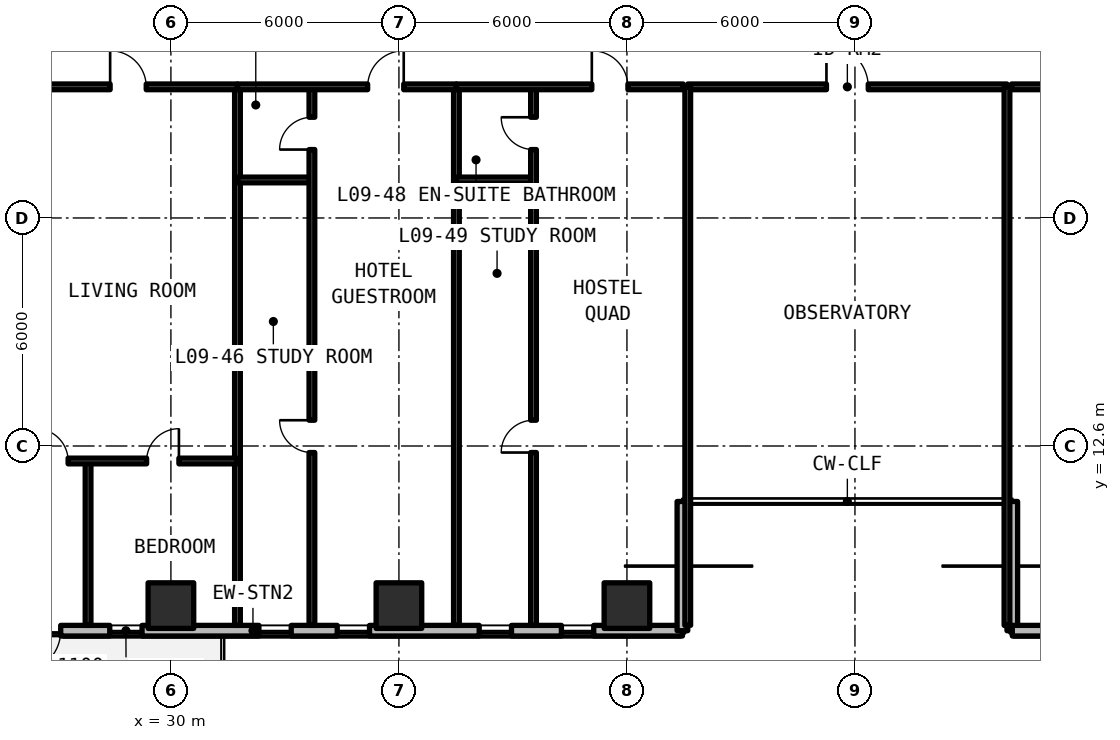
"""IFC4 building model, lengths in metres.
Left out: names, types, materials, properties, quantities, classifications, styles, units other than length and angle.
Written with IfcOpenShell. Run it as: python <this file> out.ifc"""

import sys

from ifc_helpers import new_model, si_unit, direction, frame, frame_2d, origin, origin_2d, place, context, subcontext, project, spatial, rectangle, extrude, element, fill, save


model = new_model("IFC4")
c1 = context("Model", 3, precision=1e-05, world=origin(), true_north=direction((0.0, 1.0)))
c2 = subcontext(c1, "Body", "Model", "MODEL_VIEW")
j1 = project(units=[si_unit("LENGTHUNIT", "METRE"), si_unit("PLANEANGLEUNIT", "RADIAN")], contexts=[c1])
p1 = place(None, origin())
s1 = spatial("IfcSite", under=j1, at=p1, CompositionType="ELEMENT")
p2 = place(p1, origin())
s2 = spatial("IfcBuilding", under=s1, at=p2, CompositionType="ELEMENT")
p3 = place(p2, frame((0.0, 0.0, 35.64)))
s3 = spatial("IfcBuildingStorey", under=s2, at=p3, CompositionType="ELEMENT", Elevation=35.64)
for number, where, z_axis, x_axis in (
    (1, (30.0, 8.4, 0.0), (0.0, 0.0, 1.0), (1.0, 0.0, 0.0)),
    (2, (36.0, 8.4, 0.0), (0.0, 0.0, 1.0), (1.0, 0.0, 0.0)),
    (3, (42.0, 8.4, 0.0), (0.0, 0.0, 1.0), (1.0, 0.0, 0.0)),
):
    element("IfcColumn", number, at=place(p3, frame(where, z_axis=z_axis, x_axis=x_axis)), inside=s3, PredefinedType="COLUMN", context=c2, shape_type="SweptSolid", body=[
        extrude(rectangle(XDim=1.2, YDim=1.2, at=origin_2d()), origin(), (0.0, 0.0, 1.0), 3.3),
    ])
p4 = place(p3, frame((20.858, 7.74, 0.0), z_axis=(0.0, 0.0, 1.0), x_axis=(1.0, 0.0, 0.0)))
e4 = element("IfcWall", 4, at=p4, inside=s3, PredefinedType="SOLIDWALL", context=c2, shape_type="SweptSolid", body=[
    extrude(rectangle(XDim=22.602, YDim=0.28, at=frame_2d((11.301, 0.0))), origin(), (0.0, 0.0, 1.0), 3.08),
])
p5 = place(p4, frame((5.142, 0.0, 0.0)))
e5 = element("IfcOpeningElement", 5, at=p5, cuts=e4, PredefinedType="OPENING", context=c2, shape_type="SweptSolid", body=[
    extrude(rectangle(XDim=1.1, YDim=2.15, at=frame_2d((0.55, 1.075))), frame((0.0, 0.15, 0.0), z_axis=(0.0, -1.0, 0.0), x_axis=(1.0, 0.0, 0.0)), (0.0, 0.0, 1.0), 0.3),
])
p6 = place(p4, frame((7.533, 0.0, 0.78)))
e6 = element("IfcOpeningElement", 6, at=p6, cuts=e4, PredefinedType="OPENING", context=c2, shape_type="SweptSolid", body=[
    extrude(rectangle(XDim=0.85, YDim=1.65, at=frame_2d((0.425, 0.825))), frame((0.0, 0.15, 0.0), z_axis=(0.0, -1.0, 0.0), x_axis=(1.0, 0.0, 0.0)), (0.0, 0.0, 1.0), 0.3),
])
p7 = place(p4, frame((11.458, 0.0, 0.78)))
e7 = element("IfcOpeningElement", 7, at=p7, cuts=e4, PredefinedType="OPENING", context=c2, shape_type="SweptSolid", body=[
    extrude(rectangle(XDim=0.85, YDim=1.65, at=frame_2d((0.425, 0.825))), frame((0.0, 0.15, 0.0), z_axis=(0.0, -1.0, 0.0), x_axis=(1.0, 0.0, 0.0)), (0.0, 0.0, 1.0), 0.3),
])
p8 = place(p4, frame((13.519, 0.0, 0.78)))
e8 = element("IfcOpeningElement", 8, at=p8, cuts=e4, PredefinedType="OPENING", context=c2, shape_type="SweptSolid", body=[
    extrude(rectangle(XDim=0.85, YDim=1.65, at=frame_2d((0.425, 0.825))), frame((0.0, 0.15, 0.0), z_axis=(0.0, -1.0, 0.0), x_axis=(1.0, 0.0, 0.0)), (0.0, 0.0, 1.0), 0.3),
])
p9 = place(p4, frame((17.254, 0.0, 0.78)))
e9 = element("IfcOpeningElement", 9, at=p9, cuts=e4, PredefinedType="OPENING", context=c2, shape_type="SweptSolid", body=[
    extrude(rectangle(XDim=0.85, YDim=1.65, at=frame_2d((0.425, 0.825))), frame((0.0, 0.15, 0.0), z_axis=(0.0, -1.0, 0.0), x_axis=(1.0, 0.0, 0.0)), (0.0, 0.0, 1.0), 0.3),
])
p10 = place(p4, frame((19.418, 0.0, 0.78)))
e10 = element("IfcOpeningElement", 10, at=p10, cuts=e4, PredefinedType="OPENING", context=c2, shape_type="SweptSolid", body=[
    extrude(rectangle(XDim=0.85, YDim=1.65, at=frame_2d((0.425, 0.825))), frame((0.0, 0.15, 0.0), z_axis=(0.0, -1.0, 0.0), x_axis=(1.0, 0.0, 0.0)), (0.0, 0.0, 1.0), 0.3),
])
for number, where, z_axis, x_axis in (
    (11, (43.46, 7.74, 0.0), (0.0, 0.0, 1.0), (0.0, 1.0, 0.0)),
    (12, (52.14, 11.14, 0.0), (0.0, 0.0, 1.0), (0.0, -1.0, 0.0)),
):
    element("IfcWall", number, at=place(p3, frame(where, z_axis=z_axis, x_axis=x_axis)), inside=s3, PredefinedType="SOLIDWALL", context=c2, shape_type="SweptSolid", body=[
        extrude(rectangle(XDim=3.4, YDim=0.28, at=frame_2d((1.7, 0.0))), origin(), (0.0, 0.0, 1.0), 3.08),
    ])
p11 = place(p3, frame((52.14, 7.74, 0.0), z_axis=(0.0, 0.0, 1.0), x_axis=(1.0, 0.0, 0.0)))
e13 = element("IfcWall", 13, at=p11, inside=s3, PredefinedType="SOLIDWALL", context=c2, shape_type="SweptSolid", body=[
    extrude(rectangle(XDim=44.402, YDim=0.28, at=frame_2d((22.201, 0.0))), origin(), (0.0, 0.0, 1.0), 3.08),
])
p12 = place(p11, frame((9.66, 0.0, 0.0)))
e14 = element("IfcOpeningElement", 14, at=p12, cuts=e13, PredefinedType="OPENING", context=c2, shape_type="SweptSolid", body=[
    extrude(rectangle(XDim=1.1, YDim=2.15, at=frame_2d((0.55, 1.075))), frame((0.0, 0.15, 0.0), z_axis=(0.0, -1.0, 0.0), x_axis=(1.0, 0.0, 0.0)), (0.0, 0.0, 1.0), 0.3),
])
p13 = place(p11, frame((21.76, 0.0, 0.0)))
e15 = element("IfcOpeningElement", 15, at=p13, cuts=e13, PredefinedType="OPENING", context=c2, shape_type="SweptSolid", body=[
    extrude(rectangle(XDim=1.1, YDim=2.15, at=frame_2d((0.55, 1.075))), frame((0.0, 0.15, 0.0), z_axis=(0.0, -1.0, 0.0), x_axis=(1.0, 0.0, 0.0)), (0.0, 0.0, 1.0), 0.3),
])
p14 = place(p11, frame((33.61, 0.0, 0.0)))
e16 = element("IfcOpeningElement", 16, at=p14, cuts=e13, PredefinedType="OPENING", context=c2, shape_type="SweptSolid", body=[
    extrude(rectangle(XDim=1.1, YDim=2.15, at=frame_2d((0.55, 1.075))), frame((0.0, 0.15, 0.0), z_axis=(0.0, -1.0, 0.0), x_axis=(1.0, 0.0, 0.0)), (0.0, 0.0, 1.0), 0.3),
])
p15 = place(p11, frame((2.751, 0.0, 0.78)))
e17 = element("IfcOpeningElement", 17, at=p15, cuts=e13, PredefinedType="OPENING", context=c2, shape_type="SweptSolid", body=[
    extrude(rectangle(XDim=2.2, YDim=1.66, at=frame_2d((1.1, 0.83))), frame((0.0, 0.15, 0.0), z_axis=(0.0, -1.0, 0.0), x_axis=(1.0, 0.0, 0.0)), (0.0, 0.0, 1.0), 0.3),
])
p16 = place(p11, frame((14.772, 0.0, 0.78)))
e18 = element("IfcOpeningElement", 18, at=p16, cuts=e13, PredefinedType="OPENING", context=c2, shape_type="SweptSolid", body=[
    extrude(rectangle(XDim=1.4, YDim=1.65, at=frame_2d((0.7, 0.825))), frame((0.0, 0.15, 0.0), z_axis=(0.0, -1.0, 0.0), x_axis=(1.0, 0.0, 0.0)), (0.0, 0.0, 1.0), 0.3),
])
p17 = place(p11, frame((27.925, 0.0, 0.78)))
e19 = element("IfcOpeningElement", 19, at=p17, cuts=e13, PredefinedType="OPENING", context=c2, shape_type="SweptSolid", body=[
    extrude(rectangle(XDim=2.2, YDim=1.66, at=frame_2d((1.1, 0.83))), frame((0.0, 0.15, 0.0), z_axis=(0.0, -1.0, 0.0), x_axis=(1.0, 0.0, 0.0)), (0.0, 0.0, 1.0), 0.3),
])
p18 = place(p11, frame((38.47, 0.0, 0.78)))
e20 = element("IfcOpeningElement", 20, at=p18, cuts=e13, PredefinedType="OPENING", context=c2, shape_type="SweptSolid", body=[
    extrude(rectangle(XDim=0.85, YDim=1.65, at=frame_2d((0.425, 0.825))), frame((0.0, 0.15, 0.0), z_axis=(0.0, -1.0, 0.0), x_axis=(1.0, 0.0, 0.0)), (0.0, 0.0, 1.0), 0.3),
])
p19 = place(p11, frame((40.91, 0.0, 0.78)))
e21 = element("IfcOpeningElement", 21, at=p19, cuts=e13, PredefinedType="OPENING", context=c2, shape_type="SweptSolid", body=[
    extrude(rectangle(XDim=2.2, YDim=1.66, at=frame_2d((1.1, 0.83))), frame((0.0, 0.15, 0.0), z_axis=(0.0, -1.0, 0.0), x_axis=(1.0, 0.0, 0.0)), (0.0, 0.0, 1.0), 0.3),
])
p20 = place(p3, frame((43.6, 22.05, 0.0), z_axis=(0.0, 0.0, 1.0), x_axis=(1.0, 0.0, 0.0)))
e22 = element("IfcWall", 22, at=p20, inside=s3, PredefinedType="SOLIDWALL", context=c2, shape_type="SweptSolid", body=[
    extrude(rectangle(XDim=8.4, YDim=0.15, at=frame_2d((4.2, 0.0))), origin(), (0.0, 0.0, 1.0), 2.35),
])
p21 = place(p20, frame((3.65, 0.0, 0.0)))
e23 = element("IfcOpeningElement", 23, at=p21, cuts=e22, PredefinedType="OPENING", context=c2, shape_type="SweptSolid", body=[
    extrude(rectangle(XDim=1.1, YDim=2.15, at=frame_2d((0.55, 1.075))), frame((0.0, 0.085, 0.0), z_axis=(0.0, -1.0, 0.0), x_axis=(1.0, 0.0, 0.0)), (0.0, 0.0, 1.0), 0.17),
])
for number, where, z_axis, x_axis in (
    (24, (43.6, 7.88, 0.0), (0.0, 0.0, 1.0), (0.0, 1.0, 0.0)),
    (25, (52.0, 7.88, 0.0), (0.0, 0.0, 1.0), (0.0, 1.0, 0.0)),
    (26, (31.751, 7.88, 0.0), (0.0, 0.0, 1.0), (0.0, 1.0, 0.0)),
):
    element("IfcWall", number, at=place(p3, frame(where, z_axis=z_axis, x_axis=x_axis)), inside=s3, PredefinedType="SOLIDWALL", context=c2, shape_type="SweptSolid", body=[
        extrude(rectangle(XDim=14.17, YDim=0.15, at=frame_2d((7.085, 0.0))), origin(), (0.0, 0.0, 1.0), 2.35),
    ])
p22 = place(p3, frame((27.82, 7.88, 0.0), z_axis=(0.0, 0.0, 1.0), x_axis=(0.0, 1.0, 0.0)))
e27 = element("IfcWall", 27, at=p22, inside=s3, PredefinedType="PARTITIONING", context=c2, shape_type="SweptSolid", body=[
    extrude(rectangle(XDim=4.326, YDim=0.15, at=frame_2d((2.163, 0.0))), origin(), (0.0, 0.0, 1.0), 2.35),
])
p23 = place(p3, frame((21.0, 12.206, 0.0), z_axis=(0.0, 0.0, 1.0), x_axis=(1.0, 0.0, 0.0)))
e28 = element("IfcWall", 28, at=p23, inside=s3, PredefinedType="PARTITIONING", context=c2, shape_type="SweptSolid", body=[
    extrude(rectangle(XDim=10.751, YDim=0.15, at=frame_2d((5.375, 0.0))), origin(), (0.0, 0.0, 1.0), 2.35),
])
p24 = place(p23, frame((5.445, 0.0, 0.0)))
e29 = element("IfcOpeningElement", 29, at=p24, cuts=e28, PredefinedType="OPENING", context=c2, shape_type="SweptSolid", body=[
    extrude(rectangle(XDim=0.85, YDim=2.1, at=frame_2d((0.425, 1.05))), frame((0.0, 0.085, 0.0), z_axis=(0.0, -1.0, 0.0), x_axis=(1.0, 0.0, 0.0)), (0.0, 0.0, 1.0), 0.17),
])
p25 = place(p23, frame((8.361, 0.0, 0.0)))
e30 = element("IfcOpeningElement", 30, at=p25, cuts=e28, PredefinedType="OPENING", context=c2, shape_type="SweptSolid", body=[
    extrude(rectangle(XDim=0.85, YDim=2.1, at=frame_2d((0.425, 1.05))), frame((0.0, 0.085, 0.0), z_axis=(0.0, -1.0, 0.0), x_axis=(1.0, 0.0, 0.0)), (0.0, 0.0, 1.0), 0.17),
])
p26 = place(p3, frame((21.0, 22.05, 0.0), z_axis=(0.0, 0.0, 1.0), x_axis=(1.0, 0.0, 0.0)))
e31 = element("IfcWall", 31, at=p26, inside=s3, PredefinedType="SOLIDWALL", context=c2, shape_type="SweptSolid", body=[
    extrude(rectangle(XDim=10.751, YDim=0.15, at=frame_2d((5.375, 0.0))), origin(), (0.0, 0.0, 1.0), 2.35),
])
p27 = place(p26, frame((7.401, 0.0, 0.0)))
e32 = element("IfcOpeningElement", 32, at=p27, cuts=e31, PredefinedType="OPENING", context=c2, shape_type="SweptSolid", body=[
    extrude(rectangle(XDim=0.95, YDim=2.15, at=frame_2d((0.475, 1.075))), frame((0.0, 0.085, 0.0), z_axis=(0.0, -1.0, 0.0), x_axis=(1.0, 0.0, 0.0)), (0.0, 0.0, 1.0), 0.17),
])
p28 = place(p3, frame((37.513, 7.88, 0.0), z_axis=(0.0, 0.0, 1.0), x_axis=(0.0, 1.0, 0.0)))
e33 = element("IfcWall", 33, at=p28, inside=s3, PredefinedType="SOLIDWALL", context=c2, shape_type="SweptSolid", body=[
    extrude(rectangle(XDim=14.17, YDim=0.15, at=frame_2d((7.085, 0.0))), origin(), (0.0, 0.0, 1.0), 2.35),
])
p29 = place(p3, frame((31.751, 19.6, 0.0), z_axis=(0.0, 0.0, 1.0), x_axis=(1.0, 0.0, 0.0)))
e34 = element("IfcWall", 34, at=p29, inside=s3, PredefinedType="PARTITIONING", context=c2, shape_type="SweptSolid", body=[
    extrude(rectangle(XDim=1.959, YDim=0.15, at=frame_2d((0.979, 0.0))), origin(), (0.0, 0.0, 1.0), 2.35),
])
p30 = place(p3, frame((33.71, 7.88, 0.0), z_axis=(0.0, 0.0, 1.0), x_axis=(0.0, 1.0, 0.0)))
e35 = element("IfcWall", 35, at=p30, inside=s3, PredefinedType="PARTITIONING", context=c2, shape_type="SweptSolid", body=[
    extrude(rectangle(XDim=14.17, YDim=0.15, at=frame_2d((7.085, 0.0))), origin(), (0.0, 0.0, 1.0), 2.35),
])
p31 = place(p30, frame((4.548, 0.0, 0.0)))
e36 = element("IfcOpeningElement", 36, at=p31, cuts=e35, PredefinedType="OPENING", context=c2, shape_type="SweptSolid", body=[
    extrude(rectangle(XDim=0.85, YDim=2.1, at=frame_2d((0.425, 1.05))), frame((0.0, 0.085, 0.0), z_axis=(0.0, -1.0, 0.0), x_axis=(1.0, 0.0, 0.0)), (0.0, 0.0, 1.0), 0.17),
])
p32 = place(p30, frame((12.52, 0.0, 0.0)))
e37 = element("IfcOpeningElement", 37, at=p32, cuts=e35, PredefinedType="OPENING", context=c2, shape_type="SweptSolid", body=[
    extrude(rectangle(XDim=0.85, YDim=2.1, at=frame_2d((0.425, 1.05))), frame((0.0, 0.085, 0.0), z_axis=(0.0, -1.0, 0.0), x_axis=(1.0, 0.0, 0.0)), (0.0, 0.0, 1.0), 0.17),
])
p33 = place(p3, frame((31.751, 22.05, 0.0), z_axis=(0.0, 0.0, 1.0), x_axis=(1.0, 0.0, 0.0)))
e38 = element("IfcWall", 38, at=p33, inside=s3, PredefinedType="SOLIDWALL", context=c2, shape_type="SweptSolid", body=[
    extrude(rectangle(XDim=5.761, YDim=0.15, at=frame_2d((2.881, 0.0))), origin(), (0.0, 0.0, 1.0), 2.35),
])
p34 = place(p33, frame((3.425, 0.0, 0.0)))
e39 = element("IfcOpeningElement", 39, at=p34, cuts=e38, PredefinedType="OPENING", context=c2, shape_type="SweptSolid", body=[
    extrude(rectangle(XDim=0.95, YDim=2.15, at=frame_2d((0.475, 1.075))), frame((0.0, 0.085, 0.0), z_axis=(0.0, -1.0, 0.0), x_axis=(1.0, 0.0, 0.0)), (0.0, 0.0, 1.0), 0.17),
])
p35 = place(p3, frame((37.513, 19.6, 0.0), z_axis=(0.0, 0.0, 1.0), x_axis=(1.0, 0.0, 0.0)))
e40 = element("IfcWall", 40, at=p35, inside=s3, PredefinedType="PARTITIONING", context=c2, shape_type="SweptSolid", body=[
    extrude(rectangle(XDim=2.029, YDim=0.15, at=frame_2d((1.014, 0.0))), origin(), (0.0, 0.0, 1.0), 2.35),
])
p36 = place(p3, frame((39.542, 7.88, 0.0), z_axis=(0.0, 0.0, 1.0), x_axis=(0.0, 1.0, 0.0)))
e41 = element("IfcWall", 41, at=p36, inside=s3, PredefinedType="PARTITIONING", context=c2, shape_type="SweptSolid", body=[
    extrude(rectangle(XDim=14.17, YDim=0.15, at=frame_2d((7.085, 0.0))), origin(), (0.0, 0.0, 1.0), 2.35),
])
p37 = place(p36, frame((4.548, 0.0, 0.0)))
e42 = element("IfcOpeningElement", 42, at=p37, cuts=e41, PredefinedType="OPENING", context=c2, shape_type="SweptSolid", body=[
    extrude(rectangle(XDim=0.85, YDim=2.1, at=frame_2d((0.425, 1.05))), frame((0.0, 0.085, 0.0), z_axis=(0.0, -1.0, 0.0), x_axis=(1.0, 0.0, 0.0)), (0.0, 0.0, 1.0), 0.17),
])
p38 = place(p36, frame((12.52, 0.0, 0.0)))
e43 = element("IfcOpeningElement", 43, at=p38, cuts=e41, PredefinedType="OPENING", context=c2, shape_type="SweptSolid", body=[
    extrude(rectangle(XDim=0.85, YDim=2.1, at=frame_2d((0.425, 1.05))), frame((0.0, 0.085, 0.0), z_axis=(0.0, -1.0, 0.0), x_axis=(1.0, 0.0, 0.0)), (0.0, 0.0, 1.0), 0.17),
])
p39 = place(p3, frame((37.513, 22.05, 0.0), z_axis=(0.0, 0.0, 1.0), x_axis=(1.0, 0.0, 0.0)))
e44 = element("IfcWall", 44, at=p39, inside=s3, PredefinedType="SOLIDWALL", context=c2, shape_type="SweptSolid", body=[
    extrude(rectangle(XDim=5.967, YDim=0.15, at=frame_2d((2.984, 0.0))), origin(), (0.0, 0.0, 1.0), 2.35),
])
p40 = place(p39, frame((3.563, 0.0, 0.0)))
e45 = element("IfcOpeningElement", 45, at=p40, cuts=e44, PredefinedType="OPENING", context=c2, shape_type="SweptSolid", body=[
    extrude(rectangle(XDim=0.95, YDim=2.15, at=frame_2d((0.475, 1.075))), frame((0.0, 0.085, 0.0), z_axis=(0.0, -1.0, 0.0), x_axis=(1.0, 0.0, 0.0)), (0.0, 0.0, 1.0), 0.17),
])
p41 = place(p3, frame((52.12, 22.05, 0.0), z_axis=(0.0, 0.0, 1.0), x_axis=(1.0, 0.0, 0.0)))
e46 = element("IfcWall", 46, at=p41, inside=s3, PredefinedType="SOLIDWALL", context=c2, shape_type="SweptSolid", body=[
    extrude(rectangle(XDim=6.143, YDim=0.15, at=frame_2d((3.071, 0.0))), origin(), (0.0, 0.0, 1.0), 2.35),
])
p42 = place(p41, frame((2.596, 0.0, 0.0)))
e47 = element("IfcOpeningElement", 47, at=p42, cuts=e46, PredefinedType="OPENING", context=c2, shape_type="SweptSolid", body=[
    extrude(rectangle(XDim=0.95, YDim=2.15, at=frame_2d((0.475, 1.075))), frame((0.0, 0.085, 0.0), z_axis=(0.0, -1.0, 0.0), x_axis=(1.0, 0.0, 0.0)), (0.0, 0.0, 1.0), 0.17),
])
p43 = place(p5, frame((1.1, 0.0, 0.0), z_axis=(0.0, 0.0, 1.0), x_axis=(-1.0, 0.0, 0.0)))
e48 = element("IfcDoor", 48, at=p43, inside=s3, OperationType="SINGLE_SWING_RIGHT", PredefinedType="DOOR", context=c2, shape_type="SweptSolid", body=[
    extrude(rectangle(XDim=1.1, YDim=2.15, at=frame_2d((0.55, 1.075))), frame((0.0, 0.025, 0.0), z_axis=(0.0, -1.0, 0.0), x_axis=(1.0, 0.0, 0.0)), (0.0, 0.0, 1.0), 0.05),
])
fill(e5, e48)
p44 = place(p6, origin())
e49 = element("IfcWindow", 49, at=p44, inside=s3, PartitioningType="SINGLE_PANEL", PredefinedType="WINDOW", context=c2, shape_type="SweptSolid", body=[
    extrude(rectangle(XDim=0.85, YDim=1.65, at=frame_2d((0.425, 0.825))), frame((0.0, 0.03, 0.0), z_axis=(0.0, -1.0, 0.0), x_axis=(1.0, 0.0, 0.0)), (0.0, 0.0, 1.0), 0.06),
])
fill(e6, e49)
p45 = place(p7, origin())
e50 = element("IfcWindow", 50, at=p45, inside=s3, PartitioningType="SINGLE_PANEL", PredefinedType="WINDOW", context=c2, shape_type="SweptSolid", body=[
    extrude(rectangle(XDim=0.85, YDim=1.65, at=frame_2d((0.425, 0.825))), frame((0.0, 0.03, 0.0), z_axis=(0.0, -1.0, 0.0), x_axis=(1.0, 0.0, 0.0)), (0.0, 0.0, 1.0), 0.06),
])
fill(e7, e50)
p46 = place(p8, origin())
e51 = element("IfcWindow", 51, at=p46, inside=s3, PartitioningType="SINGLE_PANEL", PredefinedType="WINDOW", context=c2, shape_type="SweptSolid", body=[
    extrude(rectangle(XDim=0.85, YDim=1.65, at=frame_2d((0.425, 0.825))), frame((0.0, 0.03, 0.0), z_axis=(0.0, -1.0, 0.0), x_axis=(1.0, 0.0, 0.0)), (0.0, 0.0, 1.0), 0.06),
])
fill(e8, e51)
p47 = place(p9, origin())
e52 = element("IfcWindow", 52, at=p47, inside=s3, PartitioningType="SINGLE_PANEL", PredefinedType="WINDOW", context=c2, shape_type="SweptSolid", body=[
    extrude(rectangle(XDim=0.85, YDim=1.65, at=frame_2d((0.425, 0.825))), frame((0.0, 0.03, 0.0), z_axis=(0.0, -1.0, 0.0), x_axis=(1.0, 0.0, 0.0)), (0.0, 0.0, 1.0), 0.06),
])
fill(e9, e52)
p48 = place(p10, origin())
e53 = element("IfcWindow", 53, at=p48, inside=s3, PartitioningType="SINGLE_PANEL", PredefinedType="WINDOW", context=c2, shape_type="SweptSolid", body=[
    extrude(rectangle(XDim=0.85, YDim=1.65, at=frame_2d((0.425, 0.825))), frame((0.0, 0.03, 0.0), z_axis=(0.0, -1.0, 0.0), x_axis=(1.0, 0.0, 0.0)), (0.0, 0.0, 1.0), 0.06),
])
fill(e10, e53)
p49 = place(p21, origin())
e54 = element("IfcDoor", 54, at=p49, inside=s3, OperationType="SINGLE_SWING_LEFT", PredefinedType="DOOR", context=c2, shape_type="SweptSolid", body=[
    extrude(rectangle(XDim=1.1, YDim=2.15, at=frame_2d((0.55, 1.075))), frame((0.0, 0.025, 0.0), z_axis=(0.0, -1.0, 0.0), x_axis=(1.0, 0.0, 0.0)), (0.0, 0.0, 1.0), 0.05),
])
fill(e23, e54)
p50 = place(p24, origin())
e55 = element("IfcDoor", 55, at=p50, inside=s3, OperationType="SINGLE_SWING_LEFT", PredefinedType="DOOR", context=c2, shape_type="SweptSolid", body=[
    extrude(rectangle(XDim=0.85, YDim=2.1, at=frame_2d((0.425, 1.05))), frame((0.0, 0.025, 0.0), z_axis=(0.0, -1.0, 0.0), x_axis=(1.0, 0.0, 0.0)), (0.0, 0.0, 1.0), 0.05),
])
fill(e29, e55)
p51 = place(p25, origin())
e56 = element("IfcDoor", 56, at=p51, inside=s3, OperationType="SINGLE_SWING_RIGHT", PredefinedType="DOOR", context=c2, shape_type="SweptSolid", body=[
    extrude(rectangle(XDim=0.85, YDim=2.1, at=frame_2d((0.425, 1.05))), frame((0.0, 0.025, 0.0), z_axis=(0.0, -1.0, 0.0), x_axis=(1.0, 0.0, 0.0)), (0.0, 0.0, 1.0), 0.05),
])
fill(e30, e56)
p52 = place(p27, origin())
e57 = element("IfcDoor", 57, at=p52, inside=s3, OperationType="SINGLE_SWING_LEFT", PredefinedType="DOOR", context=c2, shape_type="SweptSolid", body=[
    extrude(rectangle(XDim=0.95, YDim=2.15, at=frame_2d((0.475, 1.075))), frame((0.0, 0.025, 0.0), z_axis=(0.0, -1.0, 0.0), x_axis=(1.0, 0.0, 0.0)), (0.0, 0.0, 1.0), 0.05),
])
fill(e32, e57)
p53 = place(p31, origin())
e58 = element("IfcDoor", 58, at=p53, inside=s3, OperationType="SINGLE_SWING_RIGHT", PredefinedType="DOOR", context=c2, shape_type="SweptSolid", body=[
    extrude(rectangle(XDim=0.85, YDim=2.1, at=frame_2d((0.425, 1.05))), frame((0.0, 0.025, 0.0), z_axis=(0.0, -1.0, 0.0), x_axis=(1.0, 0.0, 0.0)), (0.0, 0.0, 1.0), 0.05),
])
fill(e36, e58)
p54 = place(p32, origin())
e59 = element("IfcDoor", 59, at=p54, inside=s3, OperationType="SINGLE_SWING_LEFT", PredefinedType="DOOR", context=c2, shape_type="SweptSolid", body=[
    extrude(rectangle(XDim=0.85, YDim=2.1, at=frame_2d((0.425, 1.05))), frame((0.0, 0.025, 0.0), z_axis=(0.0, -1.0, 0.0), x_axis=(1.0, 0.0, 0.0)), (0.0, 0.0, 1.0), 0.05),
])
fill(e37, e59)
p55 = place(p34, origin())
e60 = element("IfcDoor", 60, at=p55, inside=s3, OperationType="SINGLE_SWING_RIGHT", PredefinedType="DOOR", context=c2, shape_type="SweptSolid", body=[
    extrude(rectangle(XDim=0.95, YDim=2.15, at=frame_2d((0.475, 1.075))), frame((0.0, 0.025, 0.0), z_axis=(0.0, -1.0, 0.0), x_axis=(1.0, 0.0, 0.0)), (0.0, 0.0, 1.0), 0.05),
])
fill(e39, e60)
p56 = place(p37, origin())
e61 = element("IfcDoor", 61, at=p56, inside=s3, OperationType="SINGLE_SWING_LEFT", PredefinedType="DOOR", context=c2, shape_type="SweptSolid", body=[
    extrude(rectangle(XDim=0.85, YDim=2.1, at=frame_2d((0.425, 1.05))), frame((0.0, 0.025, 0.0), z_axis=(0.0, -1.0, 0.0), x_axis=(1.0, 0.0, 0.0)), (0.0, 0.0, 1.0), 0.05),
])
fill(e42, e61)
p57 = place(p38, origin())
e62 = element("IfcDoor", 62, at=p57, inside=s3, OperationType="SINGLE_SWING_RIGHT", PredefinedType="DOOR", context=c2, shape_type="SweptSolid", body=[
    extrude(rectangle(XDim=0.85, YDim=2.1, at=frame_2d((0.425, 1.05))), frame((0.0, 0.025, 0.0), z_axis=(0.0, -1.0, 0.0), x_axis=(1.0, 0.0, 0.0)), (0.0, 0.0, 1.0), 0.05),
])
fill(e43, e62)
p58 = place(p40, origin())
e63 = element("IfcDoor", 63, at=p58, inside=s3, OperationType="SINGLE_SWING_LEFT", PredefinedType="DOOR", context=c2, shape_type="SweptSolid", body=[
    extrude(rectangle(XDim=0.95, YDim=2.15, at=frame_2d((0.475, 1.075))), frame((0.0, 0.025, 0.0), z_axis=(0.0, -1.0, 0.0), x_axis=(1.0, 0.0, 0.0)), (0.0, 0.0, 1.0), 0.05),
])
fill(e45, e63)
save(model, sys.argv[1])
